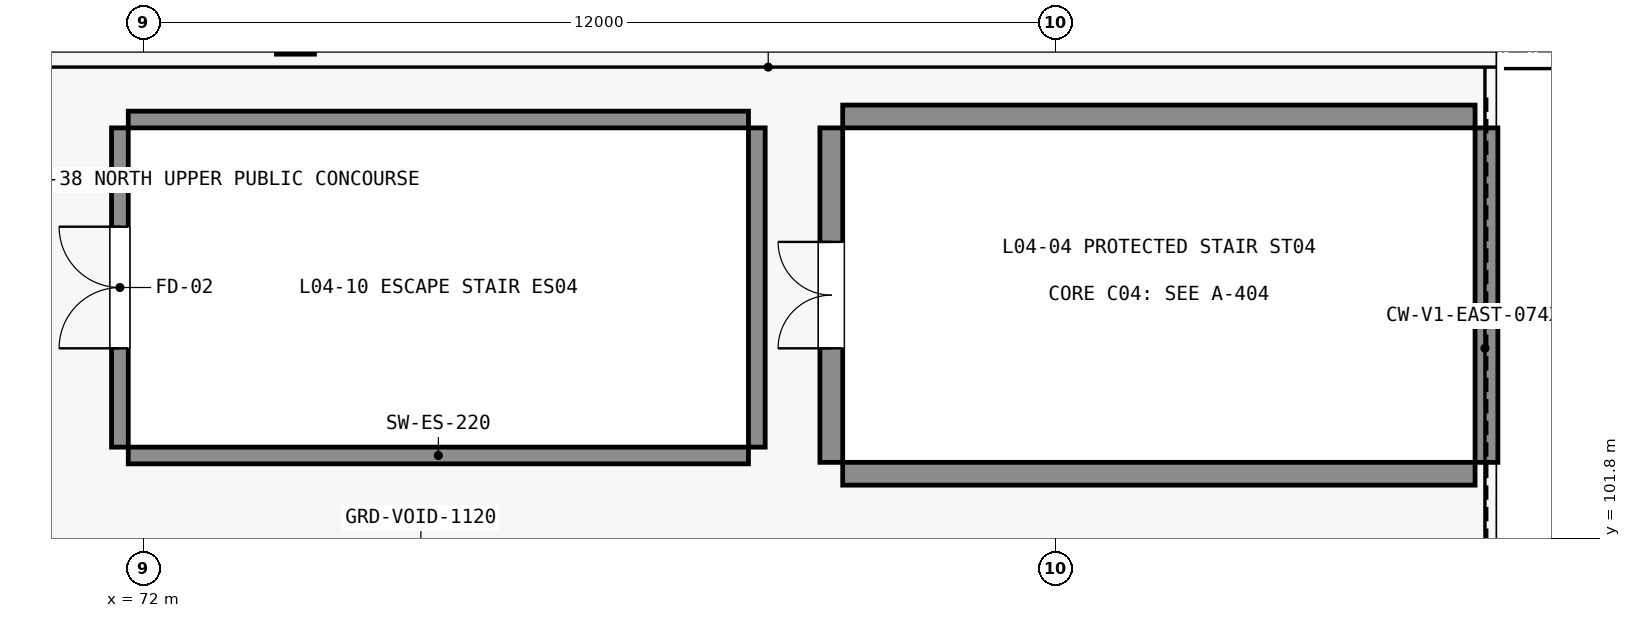
"""IFC4 building model, lengths in metres.
Left out: names, types, materials, properties, quantities, classifications, styles, units other than length and angle.
Written with IfcOpenShell. Run it as: python <this file> out.ifc"""

import sys

from ifc_helpers import new_model, si_unit, direction, frame, frame_2d, origin, origin_2d, place, context, subcontext, project, spatial, rectangle, extrude, element, fill, save


model = new_model("IFC4")
c1 = context("Model", 3, precision=1e-05, world=origin(), true_north=direction((0.0, 1.0)))
c2 = subcontext(c1, "Body", "Model", "MODEL_VIEW")
j1 = project(units=[si_unit("LENGTHUNIT", "METRE"), si_unit("PLANEANGLEUNIT", "RADIAN")], contexts=[c1])
p1 = place(None, origin())
s1 = spatial("IfcSite", under=j1, at=p1, CompositionType="ELEMENT")
p2 = place(p1, origin())
s2 = spatial("IfcBuilding", under=s1, at=p2, CompositionType="ELEMENT")
p3 = place(p2, frame((0.0, 0.0, 21.0)))
s3 = spatial("IfcBuildingStorey", under=s2, at=p3, CompositionType="ELEMENT", Elevation=21.0)
p4 = place(p3, frame((74.0, 108.42, -0.34), z_axis=(0.0, 0.0, 1.0), x_axis=(1.0, 0.0, 0.0)))
e1 = element("IfcColumn", 1, at=p4, inside=s3, PredefinedType="PILASTER", context=c2, shape_type="SweptSolid", body=[
    extrude(rectangle(XDim=0.5, YDim=0.5, at=origin_2d()), origin(), (0.0, 0.0, 1.0), 1.69),
])
for number, where, z_axis, x_axis in (
    (2, (81.2, 102.65, 0.0), (0.0, 0.0, 1.0), (1.0, 0.0, 0.0)),
    (3, (81.2, 107.35, 0.0), (0.0, 0.0, 1.0), (1.0, 0.0, 0.0)),
):
    element("IfcWall", number, at=place(p3, frame(where, z_axis=z_axis, x_axis=x_axis)), inside=s3, PredefinedType="SHEAR", context=c2, shape_type="SweptSolid", body=[
        extrude(rectangle(XDim=8.32, YDim=0.3, at=frame_2d((4.16, 0.0))), origin(), (0.0, 0.0, 1.0), 5.06),
    ])
p5 = place(p3, frame((81.05, 102.8, 0.0), z_axis=(0.0, 0.0, 1.0), x_axis=(0.0, 1.0, 0.0)))
e4 = element("IfcWall", 4, at=p5, inside=s3, PredefinedType="SHEAR", context=c2, shape_type="SweptSolid", body=[
    extrude(rectangle(XDim=4.4, YDim=0.3, at=frame_2d((2.2, 0.0))), origin(), (0.0, 0.0, 1.0), 5.06),
])
p6 = place(p5, frame((1.5, 0.0, 0.0)))
e5 = element("IfcOpeningElement", 5, at=p6, cuts=e4, PredefinedType="OPENING", context=c2, shape_type="SweptSolid", body=[
    extrude(rectangle(XDim=1.4, YDim=2.2, at=frame_2d((0.7, 1.1))), frame((0.0, 0.16, 0.0), z_axis=(0.0, -1.0, 0.0), x_axis=(1.0, 0.0, 0.0)), (0.0, 0.0, 1.0), 0.32),
])
p7 = place(p3, frame((89.67, 102.8, 0.0), z_axis=(0.0, 0.0, 1.0), x_axis=(0.0, 1.0, 0.0)))
e6 = element("IfcWall", 6, at=p7, inside=s3, PredefinedType="SHEAR", context=c2, shape_type="SweptSolid", body=[
    extrude(rectangle(XDim=4.4, YDim=0.3, at=frame_2d((2.2, 0.0))), origin(), (0.0, 0.0, 1.0), 5.06),
])
for number, where, z_axis, x_axis in (
    (7, (71.8, 102.89, 0.0), (0.0, 0.0, 1.0), (1.0, 0.0, 0.0)),
    (8, (71.8, 107.31, 0.0), (0.0, 0.0, 1.0), (1.0, 0.0, 0.0)),
):
    element("IfcWall", number, at=place(p3, frame(where, z_axis=z_axis, x_axis=x_axis)), inside=s3, PredefinedType="SHEAR", context=c2, shape_type="SweptSolid", body=[
        extrude(rectangle(XDim=8.16, YDim=0.22, at=frame_2d((4.08, 0.0))), origin(), (0.0, 0.0, 1.0), 5.06),
    ])
p8 = place(p3, frame((71.69, 103.0, 0.0), z_axis=(0.0, 0.0, 1.0), x_axis=(0.0, 1.0, 0.0)))
e9 = element("IfcWall", 9, at=p8, inside=s3, PredefinedType="SHEAR", context=c2, shape_type="SweptSolid", body=[
    extrude(rectangle(XDim=4.2, YDim=0.22, at=frame_2d((2.1, 0.0))), origin(), (0.0, 0.0, 1.0), 5.06),
])
p9 = place(p8, frame((1.3, 0.0, 0.0)))
e10 = element("IfcOpeningElement", 10, at=p9, cuts=e9, PredefinedType="OPENING", context=c2, shape_type="SweptSolid", body=[
    extrude(rectangle(XDim=1.6, YDim=2.2, at=frame_2d((0.8, 1.1))), frame((0.0, 0.12, 0.0), z_axis=(0.0, -1.0, 0.0), x_axis=(1.0, 0.0, 0.0)), (0.0, 0.0, 1.0), 0.24),
])
p10 = place(p3, frame((80.07, 103.0, 0.0), z_axis=(0.0, 0.0, 1.0), x_axis=(0.0, 1.0, 0.0)))
e11 = element("IfcWall", 11, at=p10, inside=s3, PredefinedType="SHEAR", context=c2, shape_type="SweptSolid", body=[
    extrude(rectangle(XDim=4.2, YDim=0.22, at=frame_2d((2.1, 0.0))), origin(), (0.0, 0.0, 1.0), 5.06),
])
p11 = place(p6, origin())
e12 = element("IfcDoor", 12, at=p11, inside=s3, OperationType="DOUBLE_DOOR_SINGLE_SWING", PredefinedType="DOOR", context=c2, shape_type="SweptSolid", body=[
    extrude(rectangle(XDim=1.4, YDim=2.2, at=frame_2d((0.7, 1.1))), frame((0.0, 0.025, 0.0), z_axis=(0.0, -1.0, 0.0), x_axis=(1.0, 0.0, 0.0)), (0.0, 0.0, 1.0), 0.05),
])
fill(e5, e12)
p12 = place(p9, origin())
e13 = element("IfcDoor", 13, at=p12, inside=s3, OperationType="DOUBLE_DOOR_SINGLE_SWING", PredefinedType="DOOR", context=c2, shape_type="SweptSolid", body=[
    extrude(rectangle(XDim=1.6, YDim=2.2, at=frame_2d((0.8, 1.1))), frame((0.0, 0.025, 0.0), z_axis=(0.0, -1.0, 0.0), x_axis=(1.0, 0.0, 0.0)), (0.0, 0.0, 1.0), 0.05),
])
fill(e10, e13)
save(model, sys.argv[1])
